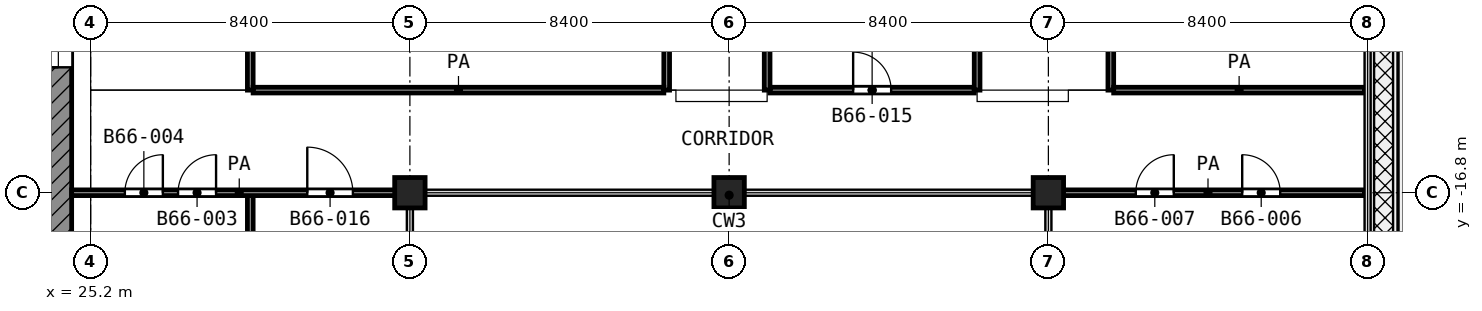
"""IFC4 building model, lengths in metres.
Left out: names, types, materials, properties, quantities, classifications, styles, units other than length and angle.
Written with IfcOpenShell. Run it as: python <this file> out.ifc"""

import sys

from ifc_helpers import new_model, si_unit, direction, frame, frame_2d, origin, origin_2d, place, context, subcontext, project, spatial, rectangle, extrude, element, fill, save


model = new_model("IFC4")
c1 = context("Model", 3, precision=1e-05, world=origin(), true_north=direction((0.0, 1.0)))
c2 = subcontext(c1, "Body", "Model", "MODEL_VIEW")
j1 = project(units=[si_unit("LENGTHUNIT", "METRE"), si_unit("PLANEANGLEUNIT", "RADIAN")], contexts=[c1])
p1 = place(None, origin())
s1 = spatial("IfcSite", under=j1, at=p1, CompositionType="ELEMENT")
p2 = place(p1, origin())
s2 = spatial("IfcBuilding", under=s1, at=p2, CompositionType="ELEMENT")
p3 = place(p2, frame((0.0, 0.0, 286.0)))
s3 = spatial("IfcBuildingStorey", under=s2, at=p3, CompositionType="ELEMENT", Elevation=286.0)
for number, where, z_axis, x_axis in (
    (1, (33.6, -16.8, 0.0), (0.0, 0.0, 1.0), (1.0, 0.0, 0.0)),
    (2, (42.0, -16.8, 0.0), (0.0, 0.0, 1.0), (1.0, 0.0, 0.0)),
    (3, (50.4, -16.8, 0.0), (0.0, 0.0, 1.0), (1.0, 0.0, 0.0)),
):
    element("IfcColumn", number, at=place(p3, frame(where, z_axis=z_axis, x_axis=x_axis)), inside=s3, PredefinedType="COLUMN", context=c2, shape_type="SweptSolid", body=[
        extrude(rectangle(XDim=0.8, YDim=0.8, at=origin_2d()), origin(), (0.0, 0.0, 1.0), 4.2),
    ])
p4 = place(p3, frame((24.35, -24.0, 0.0), z_axis=(0.0, 0.0, 1.0), x_axis=(0.0, 1.0, 0.0)))
e4 = element("IfcWall", 4, at=p4, inside=s3, PredefinedType="SHEAR", context=c2, shape_type="SweptSolid", body=[
    extrude(rectangle(XDim=18.6, YDim=0.7, at=frame_2d((9.3, 0.0))), origin(), (0.0, 0.0, 1.0), 3.6),
])
p5 = place(p4, frame((10.5, 0.0, 0.0)))
e5 = element("IfcOpeningElement", 5, at=p5, cuts=e4, PredefinedType="OPENING", context=c2, shape_type="SweptSolid", body=[
    extrude(rectangle(XDim=1.8, YDim=2.1, at=frame_2d((0.9, 1.05))), frame((0.0, 0.36, 0.0), z_axis=(0.0, -1.0, 0.0), x_axis=(1.0, 0.0, 0.0)), (0.0, 0.0, 1.0), 0.72),
])
p6 = place(p3, frame((24.7, -16.8, 0.0), z_axis=(0.0, 0.0, 1.0), x_axis=(1.0, 0.0, 0.0)))
e6 = element("IfcWall", 6, at=p6, inside=s3, PredefinedType="PARTITIONING", context=c2, shape_type="SweptSolid", body=[
    extrude(rectangle(XDim=8.82, YDim=0.15, at=frame_2d((4.41, 0.0))), origin(), (0.0, 0.0, 1.0), 3.6),
])
p7 = place(p6, frame((2.8, 0.0, 0.0)))
e7 = element("IfcOpeningElement", 7, at=p7, cuts=e6, PredefinedType="OPENING", context=c2, shape_type="SweptSolid", body=[
    extrude(rectangle(XDim=1.0, YDim=2.1, at=frame_2d((0.5, 1.05))), frame((0.0, 0.085, 0.0), z_axis=(0.0, -1.0, 0.0), x_axis=(1.0, 0.0, 0.0)), (0.0, 0.0, 1.0), 0.17),
])
p8 = place(p6, frame((1.4, 0.0, 0.0)))
e8 = element("IfcOpeningElement", 8, at=p8, cuts=e6, PredefinedType="OPENING", context=c2, shape_type="SweptSolid", body=[
    extrude(rectangle(XDim=1.0, YDim=2.1, at=frame_2d((0.5, 1.05))), frame((0.0, 0.085, 0.0), z_axis=(0.0, -1.0, 0.0), x_axis=(1.0, 0.0, 0.0)), (0.0, 0.0, 1.0), 0.17),
])
p9 = place(p6, frame((6.2, 0.0, 0.0)))
e9 = element("IfcOpeningElement", 9, at=p9, cuts=e6, PredefinedType="OPENING", context=c2, shape_type="SweptSolid", body=[
    extrude(rectangle(XDim=1.2, YDim=2.1, at=frame_2d((0.6, 1.05))), frame((0.0, 0.085, 0.0), z_axis=(0.0, -1.0, 0.0), x_axis=(1.0, 0.0, 0.0)), (0.0, 0.0, 1.0), 0.17),
])
p10 = place(p3, frame((50.48, -16.8, 0.0), z_axis=(0.0, 0.0, 1.0), x_axis=(1.0, 0.0, 0.0)))
e10 = element("IfcWall", 10, at=p10, inside=s3, PredefinedType="PARTITIONING", context=c2, shape_type="SweptSolid", body=[
    extrude(rectangle(XDim=8.24, YDim=0.15, at=frame_2d((4.12, 0.0))), origin(), (0.0, 0.0, 1.0), 3.6),
])
p11 = place(p10, frame((5.02, 0.0, 0.0)))
e11 = element("IfcOpeningElement", 11, at=p11, cuts=e10, PredefinedType="OPENING", context=c2, shape_type="SweptSolid", body=[
    extrude(rectangle(XDim=1.0, YDim=2.1, at=frame_2d((0.5, 1.05))), frame((0.0, 0.085, 0.0), z_axis=(0.0, -1.0, 0.0), x_axis=(1.0, 0.0, 0.0)), (0.0, 0.0, 1.0), 0.17),
])
p12 = place(p10, frame((2.22, 0.0, 0.0)))
e12 = element("IfcOpeningElement", 12, at=p12, cuts=e10, PredefinedType="OPENING", context=c2, shape_type="SweptSolid", body=[
    extrude(rectangle(XDim=1.0, YDim=2.1, at=frame_2d((0.5, 1.05))), frame((0.0, 0.085, 0.0), z_axis=(0.0, -1.0, 0.0), x_axis=(1.0, 0.0, 0.0)), (0.0, 0.0, 1.0), 0.17),
])
p13 = place(p3, frame((29.475, -14.1, 0.0), z_axis=(0.0, 0.0, 1.0), x_axis=(1.0, 0.0, 0.0)))
e13 = element("IfcWall", 13, at=p13, inside=s3, PredefinedType="PARTITIONING", context=c2, shape_type="SweptSolid", body=[
    extrude(rectangle(XDim=10.807, YDim=0.15, at=frame_2d((5.403, 0.0))), origin(), (0.0, 0.0, 1.0), 3.6),
])
p14 = place(p3, frame((43.075, -14.1, 0.0), z_axis=(0.0, 0.0, 1.0), x_axis=(1.0, 0.0, 0.0)))
e14 = element("IfcWall", 14, at=p14, inside=s3, PredefinedType="PARTITIONING", context=c2, shape_type="SweptSolid", body=[
    extrude(rectangle(XDim=5.375, YDim=0.15, at=frame_2d((2.688, 0.0))), origin(), (0.0, 0.0, 1.0), 3.6),
])
p15 = place(p14, frame((2.188, 0.0, 0.0)))
e15 = element("IfcOpeningElement", 15, at=p15, cuts=e14, PredefinedType="OPENING", context=c2, shape_type="SweptSolid", body=[
    extrude(rectangle(XDim=1.0, YDim=2.1, at=frame_2d((0.5, 1.05))), frame((0.0, 0.085, 0.0), z_axis=(0.0, -1.0, 0.0), x_axis=(1.0, 0.0, 0.0)), (0.0, 0.0, 1.0), 0.17),
])
p16 = place(p3, frame((52.118, -14.1, 0.0), z_axis=(0.0, 0.0, 1.0), x_axis=(1.0, 0.0, 0.0)))
e16 = element("IfcWall", 16, at=p16, inside=s3, PredefinedType="PARTITIONING", context=c2, shape_type="SweptSolid", body=[
    extrude(rectangle(XDim=6.602, YDim=0.15, at=frame_2d((3.301, 0.0))), origin(), (0.0, 0.0, 1.0), 3.6),
])
p17 = place(p3, frame((29.4, -31.198, 0.0), z_axis=(0.0, 0.0, 1.0), x_axis=(0.0, 1.0, 0.0)))
e17 = element("IfcWall", 17, at=p17, inside=s3, PredefinedType="PARTITIONING", context=c2, shape_type="SweptSolid", body=[
    extrude(rectangle(XDim=14.323, YDim=0.15, at=frame_2d((7.162, 0.0))), origin(), (0.0, 0.0, 1.0), 3.6),
])
p18 = place(p3, frame((29.4, -14.1, 0.0), z_axis=(0.0, 0.0, 1.0), x_axis=(0.0, 1.0, 0.0)))
e18 = element("IfcWall", 18, at=p18, inside=s3, PredefinedType="PARTITIONING", context=c2, shape_type="SweptSolid", body=[
    extrude(rectangle(XDim=14.02, YDim=0.15, at=frame_2d((7.01, 0.0))), origin(), (0.0, 0.0, 1.0), 3.6),
])
p19 = place(p3, frame((40.357, -14.1, 0.0), z_axis=(0.0, 0.0, 1.0), x_axis=(0.0, 1.0, 0.0)))
e19 = element("IfcWall", 19, at=p19, inside=s3, PredefinedType="PARTITIONING", context=c2, shape_type="SweptSolid", body=[
    extrude(rectangle(XDim=14.02, YDim=0.15, at=frame_2d((7.01, 0.0))), origin(), (0.0, 0.0, 1.0), 3.6),
])
p20 = place(p19, frame((6.55, 0.0, 0.0)))
e20 = element("IfcOpeningElement", 20, at=p20, cuts=e19, PredefinedType="OPENING", context=c2, shape_type="SweptSolid", body=[
    extrude(rectangle(XDim=1.0, YDim=2.1, at=frame_2d((0.5, 1.05))), frame((0.0, 0.085, 0.0), z_axis=(0.0, -1.0, 0.0), x_axis=(1.0, 0.0, 0.0)), (0.0, 0.0, 1.0), 0.17),
])
p21 = place(p3, frame((43.0, -14.1, 0.0), z_axis=(0.0, 0.0, 1.0), x_axis=(0.0, 1.0, 0.0)))
e21 = element("IfcWall", 21, at=p21, inside=s3, PredefinedType="PARTITIONING", context=c2, shape_type="SweptSolid", body=[
    extrude(rectangle(XDim=5.3, YDim=0.15, at=frame_2d((2.65, 0.0))), origin(), (0.0, 0.0, 1.0), 3.6),
])
p22 = place(p3, frame((48.525, -14.1, 0.0), z_axis=(0.0, 0.0, 1.0), x_axis=(0.0, 1.0, 0.0)))
e22 = element("IfcWall", 22, at=p22, inside=s3, PredefinedType="PARTITIONING", context=c2, shape_type="SweptSolid", body=[
    extrude(rectangle(XDim=5.37, YDim=0.15, at=frame_2d((2.685, 0.0))), origin(), (0.0, 0.0, 1.0), 3.6),
])
p23 = place(p3, frame((52.043, -14.1, 0.0), z_axis=(0.0, 0.0, 1.0), x_axis=(0.0, 1.0, 0.0)))
e23 = element("IfcWall", 23, at=p23, inside=s3, PredefinedType="PARTITIONING", context=c2, shape_type="SweptSolid", body=[
    extrude(rectangle(XDim=12.248, YDim=0.15, at=frame_2d((6.124, 0.0))), origin(), (0.0, 0.0, 1.0), 3.6),
])
p24 = place(p23, frame((6.124, 0.0, 0.0)))
e24 = element("IfcOpeningElement", 24, at=p24, cuts=e23, PredefinedType="OPENING", context=c2, shape_type="SweptSolid", body=[
    extrude(rectangle(XDim=1.0, YDim=2.1, at=frame_2d((0.5, 1.05))), frame((0.0, 0.085, 0.0), z_axis=(0.0, -1.0, 0.0), x_axis=(1.0, 0.0, 0.0)), (0.0, 0.0, 1.0), 0.17),
])
p25 = place(p5, origin())
e25 = element("IfcDoor", 25, at=p25, inside=s3, OperationType="DOUBLE_DOOR_SINGLE_SWING", PredefinedType="DOOR", context=c2, shape_type="SweptSolid", body=[
    extrude(rectangle(XDim=1.8, YDim=2.1, at=frame_2d((0.9, 1.05))), frame((0.0, 0.025, 0.0), z_axis=(0.0, -1.0, 0.0), x_axis=(1.0, 0.0, 0.0)), (0.0, 0.0, 1.0), 0.05),
])
fill(e5, e25)
p26 = place(p7, origin())
e26 = element("IfcDoor", 26, at=p26, inside=s3, OperationType="SINGLE_SWING_RIGHT", PredefinedType="DOOR", context=c2, shape_type="SweptSolid", body=[
    extrude(rectangle(XDim=1.0, YDim=2.1, at=frame_2d((0.5, 1.05))), frame((0.0, 0.025, 0.0), z_axis=(0.0, -1.0, 0.0), x_axis=(1.0, 0.0, 0.0)), (0.0, 0.0, 1.0), 0.05),
])
fill(e7, e26)
p27 = place(p8, origin())
e27 = element("IfcDoor", 27, at=p27, inside=s3, OperationType="SINGLE_SWING_RIGHT", PredefinedType="DOOR", context=c2, shape_type="SweptSolid", body=[
    extrude(rectangle(XDim=1.0, YDim=2.1, at=frame_2d((0.5, 1.05))), frame((0.0, 0.025, 0.0), z_axis=(0.0, -1.0, 0.0), x_axis=(1.0, 0.0, 0.0)), (0.0, 0.0, 1.0), 0.05),
])
fill(e8, e27)
p28 = place(p9, origin())
e28 = element("IfcDoor", 28, at=p28, inside=s3, OperationType="SINGLE_SWING_LEFT", PredefinedType="DOOR", context=c2, shape_type="SweptSolid", body=[
    extrude(rectangle(XDim=1.2, YDim=2.1, at=frame_2d((0.6, 1.05))), frame((0.0, 0.025, 0.0), z_axis=(0.0, -1.0, 0.0), x_axis=(1.0, 0.0, 0.0)), (0.0, 0.0, 1.0), 0.05),
])
fill(e9, e28)
p29 = place(p11, origin())
e29 = element("IfcDoor", 29, at=p29, inside=s3, OperationType="SINGLE_SWING_LEFT", PredefinedType="DOOR", context=c2, shape_type="SweptSolid", body=[
    extrude(rectangle(XDim=1.0, YDim=2.1, at=frame_2d((0.5, 1.05))), frame((0.0, 0.025, 0.0), z_axis=(0.0, -1.0, 0.0), x_axis=(1.0, 0.0, 0.0)), (0.0, 0.0, 1.0), 0.05),
])
fill(e11, e29)
p30 = place(p12, origin())
e30 = element("IfcDoor", 30, at=p30, inside=s3, OperationType="SINGLE_SWING_RIGHT", PredefinedType="DOOR", context=c2, shape_type="SweptSolid", body=[
    extrude(rectangle(XDim=1.0, YDim=2.1, at=frame_2d((0.5, 1.05))), frame((0.0, 0.025, 0.0), z_axis=(0.0, -1.0, 0.0), x_axis=(1.0, 0.0, 0.0)), (0.0, 0.0, 1.0), 0.05),
])
fill(e12, e30)
p31 = place(p15, origin())
e31 = element("IfcDoor", 31, at=p31, inside=s3, OperationType="SINGLE_SWING_LEFT", PredefinedType="DOOR", context=c2, shape_type="SweptSolid", body=[
    extrude(rectangle(XDim=1.0, YDim=2.1, at=frame_2d((0.5, 1.05))), frame((0.0, 0.025, 0.0), z_axis=(0.0, -1.0, 0.0), x_axis=(1.0, 0.0, 0.0)), (0.0, 0.0, 1.0), 0.05),
])
fill(e15, e31)
save(model, sys.argv[1])
